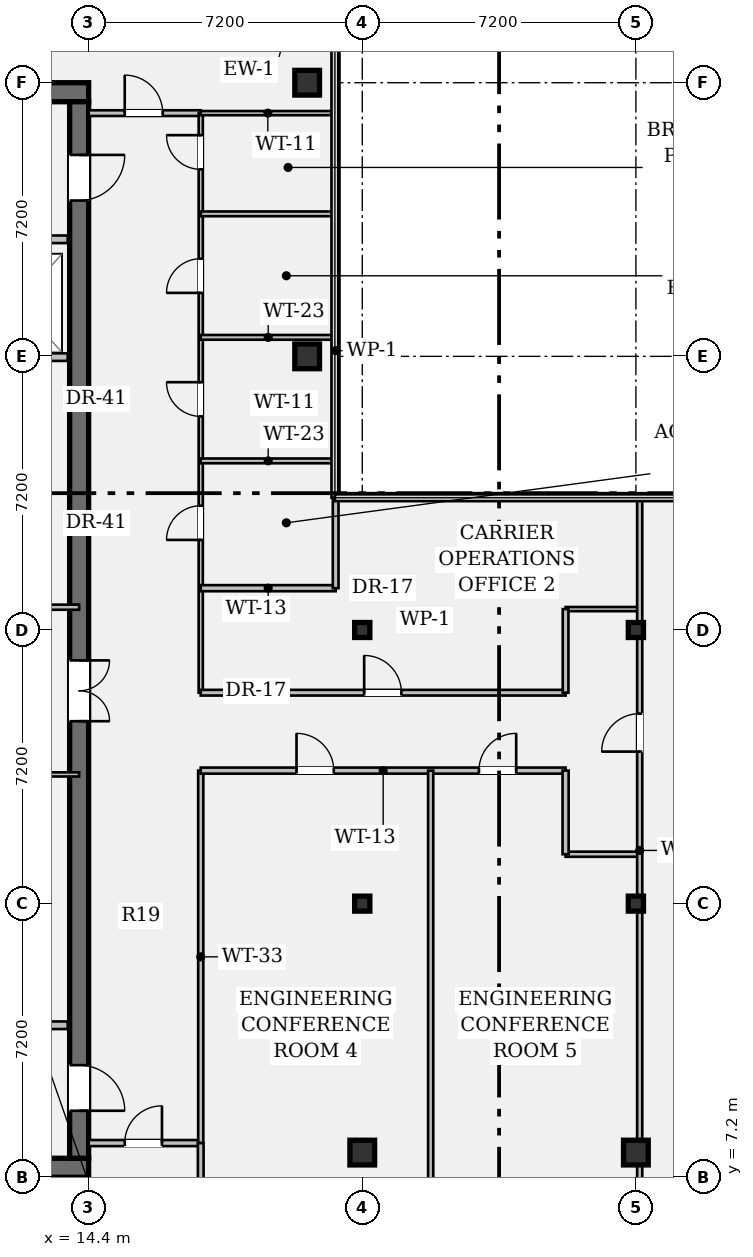
"""IFC4 building model, lengths in metres.
Left out: names, types, materials, properties, quantities, classifications, styles, units other than length and angle.
Written with IfcOpenShell. Run it as: python <this file> out.ifc"""

import sys

from ifc_helpers import new_model, si_unit, direction, frame, frame_2d, origin, origin_2d, place, context, subcontext, project, spatial, rectangle, hollow_rectangle, i_section, extrude, element, fill, save


model = new_model("IFC4")
c1 = context("Model", 3, precision=1e-05, world=origin(), true_north=direction((0.0, 1.0)))
c2 = subcontext(c1, "Body", "Model", "MODEL_VIEW")
j1 = project(units=[si_unit("LENGTHUNIT", "METRE"), si_unit("PLANEANGLEUNIT", "RADIAN")], contexts=[c1])
p1 = place(None, origin())
s1 = spatial("IfcSite", under=j1, at=p1, CompositionType="ELEMENT")
p2 = place(p1, origin())
s2 = spatial("IfcBuilding", under=s1, at=p2, CompositionType="ELEMENT")
p3 = place(p2, frame((0.0, 0.0, 262.15)))
s3 = spatial("IfcBuildingStorey", under=s2, at=p3, CompositionType="ELEMENT", Elevation=262.15)
for number, where, z_axis, x_axis in (
    (1, (0.5, 7.45, 0.0), (0.0, 0.0, 1.0), (1.0, 0.0, 0.0)),
    (2, (0.5, 35.75, 0.0), (0.0, 0.0, 1.0), (1.0, 0.0, 0.0)),
):
    element("IfcWall", number, at=place(p3, frame(where, z_axis=z_axis, x_axis=x_axis)), inside=s3, PredefinedType="SHEAR", context=c2, shape_type="SweptSolid", body=[
        extrude(rectangle(XDim=13.9, YDim=0.5, at=frame_2d((6.95, 0.0))), origin(), (0.0, 0.0, 1.0), 3.24),
    ])
p4 = place(p3, frame((14.15, 35.5, 0.0), z_axis=(0.0, 0.0, 1.0), x_axis=(0.0, -1.0, 0.0)))
e3 = element("IfcWall", 3, at=p4, inside=s3, PredefinedType="SHEAR", context=c2, shape_type="SweptSolid", body=[
    extrude(rectangle(XDim=27.8, YDim=0.5, at=frame_2d((13.9, 0.0))), origin(), (0.0, 0.0, 1.0), 3.24),
])
p5 = place(p4, frame((1.4, 0.0, 0.0)))
e4 = element("IfcOpeningElement", 4, at=p5, cuts=e3, PredefinedType="OPENING", context=c2, shape_type="SweptSolid", body=[
    extrude(rectangle(XDim=1.2, YDim=2.15, at=frame_2d((0.6, 1.075))), frame((0.0, 0.262, 0.0), z_axis=(0.0, -1.0, 0.0), x_axis=(1.0, 0.0, 0.0)), (0.0, 0.0, 1.0), 0.524),
])
p6 = place(p4, frame((25.35, 0.0, 0.0)))
e5 = element("IfcOpeningElement", 5, at=p6, cuts=e3, PredefinedType="OPENING", context=c2, shape_type="SweptSolid", body=[
    extrude(rectangle(XDim=1.2, YDim=2.15, at=frame_2d((0.6, 1.075))), frame((0.0, 0.262, 0.0), z_axis=(0.0, -1.0, 0.0), x_axis=(1.0, 0.0, 0.0)), (0.0, 0.0, 1.0), 0.524),
])
p7 = place(p4, frame((14.7, 0.0, 0.0)))
e6 = element("IfcOpeningElement", 6, at=p7, cuts=e3, PredefinedType="OPENING", context=c2, shape_type="SweptSolid", body=[
    extrude(rectangle(XDim=1.6, YDim=2.2, at=frame_2d((0.8, 1.1))), frame((0.0, 0.262, 0.0), z_axis=(0.0, -1.0, 0.0), x_axis=(1.0, 0.0, 0.0)), (0.0, 0.0, 1.0), 0.524),
])
for number, where, z_axis, x_axis in (
    (7, (20.15, 28.8, 0.0), (0.0, 0.0, 1.0), (1.0, 0.0, 0.0)),
    (8, (20.15, 36.0, 0.0), (0.0, 0.0, 1.0), (1.0, 0.0, 0.0)),
    (9, (21.6, 7.85, 0.0), (0.0, 0.0, 1.0), (1.0, 0.0, 0.0)),
):
    element("IfcColumn", number, at=place(p3, frame(where, z_axis=z_axis, x_axis=x_axis)), inside=s3, PredefinedType="COLUMN", context=c2, shape_type="SweptSolid", body=[
        extrude(hollow_rectangle(XDim=0.65, YDim=0.65, WallThickness=0.04, at=origin_2d()), origin(), (0.0, 0.0, 1.0), 3.24),
    ])
for number, where, z_axis, x_axis in (
    (10, (21.6, 14.4, 0.0), (0.0, 0.0, 1.0), (1.0, 0.0, 0.0)),
    (11, (21.6, 21.6, 0.0), (0.0, 0.0, 1.0), (1.0, 0.0, 0.0)),
):
    element("IfcColumn", number, at=place(p3, frame(where, z_axis=z_axis, x_axis=x_axis)), inside=s3, PredefinedType="COLUMN", context=c2, shape_type="SweptSolid", body=[
        extrude(i_section(OverallWidth=0.399, OverallDepth=0.394, WebThickness=0.023, FlangeThickness=0.037, FilletRadius=0.018, at=origin_2d()), origin(), (0.0, 0.0, 1.0), 3.24),
    ])
p8 = place(p3, frame((28.8, 7.85, 0.0), z_axis=(0.0, 0.0, 1.0), x_axis=(1.0, 0.0, 0.0)))
e12 = element("IfcColumn", 12, at=p8, inside=s3, PredefinedType="COLUMN", context=c2, shape_type="SweptSolid", body=[
    extrude(hollow_rectangle(XDim=0.65, YDim=0.65, WallThickness=0.04, at=origin_2d()), origin(), (0.0, 0.0, 1.0), 3.24),
])
for number, where, z_axis, x_axis in (
    (13, (28.8, 14.4, 0.0), (0.0, 0.0, 1.0), (1.0, 0.0, 0.0)),
    (14, (28.8, 21.6, 0.0), (0.0, 0.0, 1.0), (1.0, 0.0, 0.0)),
):
    element("IfcColumn", number, at=place(p3, frame(where, z_axis=z_axis, x_axis=x_axis)), inside=s3, PredefinedType="COLUMN", context=c2, shape_type="SweptSolid", body=[
        extrude(i_section(OverallWidth=0.399, OverallDepth=0.394, WebThickness=0.023, FlangeThickness=0.037, FilletRadius=0.018, at=origin_2d()), origin(), (0.0, 0.0, 1.0), 3.24),
    ])
p9 = place(p3, frame((8.7, 31.88, 0.0), z_axis=(0.0, 0.0, 1.0), x_axis=(1.0, 0.0, 0.0)))
e15 = element("IfcWall", 15, at=p9, inside=s3, PredefinedType="PARTITIONING", context=c2, shape_type="SweptSolid", body=[
    extrude(rectangle(XDim=5.15, YDim=0.2, at=frame_2d((2.575, 0.0))), origin(), (0.0, 0.0, 1.0), 3.24),
])
p10 = place(p9, frame((0.75, 0.0, 0.0)))
e16 = element("IfcOpeningElement", 16, at=p10, cuts=e15, PredefinedType="OPENING", context=c2, shape_type="SweptSolid", body=[
    extrude(rectangle(XDim=1.2, YDim=2.2, at=frame_2d((0.6, 1.1))), frame((0.0, 0.112, 0.0), z_axis=(0.0, -1.0, 0.0), x_axis=(1.0, 0.0, 0.0)), (0.0, 0.0, 1.0), 0.224),
])
p11 = place(p9, frame((3.25, 0.0, 0.0)))
e17 = element("IfcOpeningElement", 17, at=p11, cuts=e15, PredefinedType="OPENING", context=c2, shape_type="SweptSolid", body=[
    extrude(rectangle(XDim=1.2, YDim=2.2, at=frame_2d((0.6, 1.1))), frame((0.0, 0.112, 0.0), z_axis=(0.0, -1.0, 0.0), x_axis=(1.0, 0.0, 0.0)), (0.0, 0.0, 1.0), 0.224),
])
for number, where, z_axis, x_axis in (
    (18, (8.7, 11.2, 0.0), (0.0, 0.0, 1.0), (1.0, 0.0, 0.0)),
    (19, (8.7, 28.78, 0.0), (0.0, 0.0, 1.0), (1.0, 0.0, 0.0)),
):
    element("IfcWall", number, at=place(p3, frame(where, z_axis=z_axis, x_axis=x_axis)), inside=s3, PredefinedType="PARTITIONING", context=c2, shape_type="SweptSolid", body=[
        extrude(rectangle(XDim=5.15, YDim=0.2, at=frame_2d((2.575, 0.0))), origin(), (0.0, 0.0, 1.0), 3.24),
    ])
p12 = place(p3, frame((7.1, 22.2, 0.0), z_axis=(0.0, 0.0, 1.0), x_axis=(1.0, 0.0, 0.0)))
e20 = element("IfcWall", 20, at=p12, inside=s3, PredefinedType="PARTITIONING", context=c2, shape_type="SweptSolid", body=[
    extrude(rectangle(XDim=7.05, YDim=0.135, at=frame_2d((3.525, 0.0))), origin(), (0.0, 0.0, 1.0), 3.24),
])
p13 = place(p12, frame((2.4, 0.0, 0.0)))
e21 = element("IfcOpeningElement", 21, at=p13, cuts=e20, PredefinedType="OPENING", context=c2, shape_type="SweptSolid", body=[
    extrude(rectangle(XDim=1.0, YDim=2.15, at=frame_2d((0.5, 1.075))), frame((0.0, 0.08, 0.0), z_axis=(0.0, -1.0, 0.0), x_axis=(1.0, 0.0, 0.0)), (0.0, 0.0, 1.0), 0.159),
])
p14 = place(p3, frame((5.15, 17.8, 0.0), z_axis=(0.0, 0.0, 1.0), x_axis=(1.0, 0.0, 0.0)))
e22 = element("IfcWall", 22, at=p14, inside=s3, PredefinedType="PARTITIONING", context=c2, shape_type="SweptSolid", body=[
    extrude(rectangle(XDim=9.0, YDim=0.11, at=frame_2d((4.5, 0.0))), origin(), (0.0, 0.0, 1.0), 3.24),
])
p15 = place(p14, frame((2.65, 0.0, 0.0)))
e23 = element("IfcOpeningElement", 23, at=p15, cuts=e22, PredefinedType="OPENING", context=c2, shape_type="SweptSolid", body=[
    extrude(rectangle(XDim=0.9, YDim=2.15, at=frame_2d((0.45, 1.075))), frame((0.0, 0.067, 0.0), z_axis=(0.0, -1.0, 0.0), x_axis=(1.0, 0.0, 0.0)), (0.0, 0.0, 1.0), 0.134),
])
p16 = place(p14, frame((6.15, 0.0, 0.0)))
e24 = element("IfcOpeningElement", 24, at=p16, cuts=e22, PredefinedType="OPENING", context=c2, shape_type="SweptSolid", body=[
    extrude(rectangle(XDim=0.98, YDim=2.15, at=frame_2d((0.49, 1.075))), frame((0.0, 0.067, 0.0), z_axis=(0.0, -1.0, 0.0), x_axis=(1.0, 0.0, 0.0)), (0.0, 0.0, 1.0), 0.134),
])
p17 = place(p3, frame((14.4, 8.1, 0.0), z_axis=(0.0, 0.0, 1.0), x_axis=(1.0, 0.0, 0.0)))
e25 = element("IfcWall", 25, at=p17, inside=s3, PredefinedType="PARTITIONING", context=c2, shape_type="SweptSolid", body=[
    extrude(rectangle(XDim=2.95, YDim=0.16, at=frame_2d((1.475, 0.0))), origin(), (0.0, 0.0, 1.0), 3.24),
])
p18 = place(p17, frame((0.95, 0.0, 0.0)))
e26 = element("IfcOpeningElement", 26, at=p18, cuts=e25, PredefinedType="OPENING", context=c2, shape_type="SweptSolid", body=[
    extrude(rectangle(XDim=0.98, YDim=2.15, at=frame_2d((0.49, 1.075))), frame((0.0, 0.092, 0.0), z_axis=(0.0, -1.0, 0.0), x_axis=(1.0, 0.0, 0.0)), (0.0, 0.0, 1.0), 0.184),
])
p19 = place(p3, frame((14.4, 35.2, 0.0), z_axis=(0.0, 0.0, 1.0), x_axis=(1.0, 0.0, 0.0)))
e27 = element("IfcWall", 27, at=p19, inside=s3, PredefinedType="PARTITIONING", context=c2, shape_type="SweptSolid", body=[
    extrude(rectangle(XDim=2.95, YDim=0.15, at=frame_2d((1.475, 0.0))), origin(), (0.0, 0.0, 1.0), 2.808),
])
p20 = place(p19, frame((0.95, 0.0, 0.0)))
e28 = element("IfcOpeningElement", 28, at=p20, cuts=e27, PredefinedType="OPENING", context=c2, shape_type="SweptSolid", body=[
    extrude(rectangle(XDim=1.0, YDim=2.15, at=frame_2d((0.5, 1.075))), frame((0.0, 0.087, 0.0), z_axis=(0.0, -1.0, 0.0), x_axis=(1.0, 0.0, 0.0)), (0.0, 0.0, 1.0), 0.174),
])
p21 = place(p3, frame((17.35, 8.1, 0.0), z_axis=(0.0, 0.0, 1.0), x_axis=(0.0, 1.0, 0.0)))
e29 = element("IfcWall", 29, at=p21, inside=s3, PredefinedType="PARTITIONING", context=c2, shape_type="SweptSolid", body=[
    extrude(rectangle(XDim=9.8, YDim=0.135, at=frame_2d((4.9, 0.0))), origin(), (0.0, 0.0, 1.0), 2.676),
])
p22 = place(p3, frame((17.35, 19.95, 0.0), z_axis=(0.0, 0.0, 1.0), x_axis=(0.0, 1.0, 0.0)))
e30 = element("IfcWall", 30, at=p22, inside=s3, PredefinedType="PARTITIONING", context=c2, shape_type="SweptSolid", body=[
    extrude(rectangle(XDim=15.25, YDim=0.11, at=frame_2d((7.625, 0.0))), origin(), (0.0, 0.0, 1.0), 2.676),
])
p23 = place(p22, frame((4.02, 0.0, 0.0)))
e31 = element("IfcOpeningElement", 31, at=p23, cuts=e30, PredefinedType="OPENING", context=c2, shape_type="SweptSolid", body=[
    extrude(rectangle(XDim=0.9, YDim=2.15, at=frame_2d((0.45, 1.075))), frame((0.0, 0.067, 0.0), z_axis=(0.0, -1.0, 0.0), x_axis=(1.0, 0.0, 0.0)), (0.0, 0.0, 1.0), 0.134),
])
p24 = place(p22, frame((7.27, 0.0, 0.0)))
e32 = element("IfcOpeningElement", 32, at=p24, cuts=e30, PredefinedType="OPENING", context=c2, shape_type="SweptSolid", body=[
    extrude(rectangle(XDim=0.9, YDim=2.15, at=frame_2d((0.45, 1.075))), frame((0.0, 0.067, 0.0), z_axis=(0.0, -1.0, 0.0), x_axis=(1.0, 0.0, 0.0)), (0.0, 0.0, 1.0), 0.134),
])
p25 = place(p22, frame((10.52, 0.0, 0.0)))
e33 = element("IfcOpeningElement", 33, at=p25, cuts=e30, PredefinedType="OPENING", context=c2, shape_type="SweptSolid", body=[
    extrude(rectangle(XDim=0.9, YDim=2.15, at=frame_2d((0.45, 1.075))), frame((0.0, 0.067, 0.0), z_axis=(0.0, -1.0, 0.0), x_axis=(1.0, 0.0, 0.0)), (0.0, 0.0, 1.0), 0.134),
])
p26 = place(p22, frame((13.77, 0.0, 0.0)))
e34 = element("IfcOpeningElement", 34, at=p26, cuts=e30, PredefinedType="OPENING", context=c2, shape_type="SweptSolid", body=[
    extrude(rectangle(XDim=0.9, YDim=2.15, at=frame_2d((0.45, 1.075))), frame((0.0, 0.067, 0.0), z_axis=(0.0, -1.0, 0.0), x_axis=(1.0, 0.0, 0.0)), (0.0, 0.0, 1.0), 0.134),
])
p27 = place(p3, frame((17.35, 17.9, 0.0), z_axis=(0.0, 0.0, 1.0), x_axis=(1.0, 0.0, 0.0)))
e35 = element("IfcWall", 35, at=p27, inside=s3, PredefinedType="PARTITIONING", context=c2, shape_type="SweptSolid", body=[
    extrude(rectangle(XDim=9.6, YDim=0.16, at=frame_2d((4.8, 0.0))), origin(), (0.0, 0.0, 1.0), 2.676),
])
p28 = place(p27, frame((2.52, 0.0, 0.0)))
e36 = element("IfcOpeningElement", 36, at=p28, cuts=e35, PredefinedType="OPENING", context=c2, shape_type="SweptSolid", body=[
    extrude(rectangle(XDim=0.98, YDim=2.15, at=frame_2d((0.49, 1.075))), frame((0.0, 0.092, 0.0), z_axis=(0.0, -1.0, 0.0), x_axis=(1.0, 0.0, 0.0)), (0.0, 0.0, 1.0), 0.184),
])
p29 = place(p27, frame((7.32, 0.0, 0.0)))
e37 = element("IfcOpeningElement", 37, at=p29, cuts=e35, PredefinedType="OPENING", context=c2, shape_type="SweptSolid", body=[
    extrude(rectangle(XDim=0.98, YDim=2.15, at=frame_2d((0.49, 1.075))), frame((0.0, 0.092, 0.0), z_axis=(0.0, -1.0, 0.0), x_axis=(1.0, 0.0, 0.0)), (0.0, 0.0, 1.0), 0.184),
])
p30 = place(p3, frame((17.35, 19.95, 0.0), z_axis=(0.0, 0.0, 1.0), x_axis=(1.0, 0.0, 0.0)))
e38 = element("IfcWall", 38, at=p30, inside=s3, PredefinedType="PARTITIONING", context=c2, shape_type="SweptSolid", body=[
    extrude(rectangle(XDim=9.6, YDim=0.15, at=frame_2d((4.8, 0.0))), origin(), (0.0, 0.0, 1.0), 2.676),
])
p31 = place(p30, frame((4.3, 0.0, 0.0)))
e39 = element("IfcOpeningElement", 39, at=p31, cuts=e38, PredefinedType="OPENING", context=c2, shape_type="SweptSolid", body=[
    extrude(rectangle(XDim=0.98, YDim=2.15, at=frame_2d((0.49, 1.075))), frame((0.0, 0.087, 0.0), z_axis=(0.0, -1.0, 0.0), x_axis=(1.0, 0.0, 0.0)), (0.0, 0.0, 1.0), 0.174),
])
p32 = place(p3, frame((26.95, 15.7, 0.0), z_axis=(0.0, 0.0, 1.0), x_axis=(1.0, 0.0, 0.0)))
e40 = element("IfcWall", 40, at=p32, inside=s3, PredefinedType="PARTITIONING", context=c2, shape_type="SweptSolid", body=[
    extrude(rectangle(XDim=1.95, YDim=0.135, at=frame_2d((0.975, 0.0))), origin(), (0.0, 0.0, 1.0), 2.676),
])
p33 = place(p3, frame((26.95, 22.15, 0.0), z_axis=(0.0, 0.0, 1.0), x_axis=(1.0, 0.0, 0.0)))
e41 = element("IfcWall", 41, at=p33, inside=s3, PredefinedType="PARTITIONING", context=c2, shape_type="SweptSolid", body=[
    extrude(rectangle(XDim=1.95, YDim=0.11, at=frame_2d((0.975, 0.0))), origin(), (0.0, 0.0, 1.0), 3.24),
])
p34 = place(p3, frame((26.95, 15.7, 0.0), z_axis=(0.0, 0.0, 1.0), x_axis=(0.0, 1.0, 0.0)))
e42 = element("IfcWall", 42, at=p34, inside=s3, PredefinedType="PARTITIONING", context=c2, shape_type="SweptSolid", body=[
    extrude(rectangle(XDim=2.2, YDim=0.16, at=frame_2d((1.1, 0.0))), origin(), (0.0, 0.0, 1.0), 3.24),
])
p35 = place(p3, frame((26.95, 19.95, 0.0), z_axis=(0.0, 0.0, 1.0), x_axis=(0.0, 1.0, 0.0)))
e43 = element("IfcWall", 43, at=p35, inside=s3, PredefinedType="PARTITIONING", context=c2, shape_type="SweptSolid", body=[
    extrude(rectangle(XDim=2.2, YDim=0.15, at=frame_2d((1.1, 0.0))), origin(), (0.0, 0.0, 1.0), 2.676),
])
p36 = place(p3, frame((28.9, 6.52, 0.0), z_axis=(0.0, 0.0, 1.0), x_axis=(0.0, 1.0, 0.0)))
e44 = element("IfcWall", 44, at=p36, inside=s3, PredefinedType="PARTITIONING", context=c2, shape_type="SweptSolid", body=[
    extrude(rectangle(XDim=18.56, YDim=0.135, at=frame_2d((9.28, 0.0))), origin(), (0.0, 0.0, 1.0), 2.676),
])
p37 = place(p36, frame((11.88, 0.0, 0.0)))
e45 = element("IfcOpeningElement", 45, at=p37, cuts=e44, PredefinedType="OPENING", context=c2, shape_type="SweptSolid", body=[
    extrude(rectangle(XDim=1.0, YDim=2.15, at=frame_2d((0.5, 1.075))), frame((0.0, 0.08, 0.0), z_axis=(0.0, -1.0, 0.0), x_axis=(1.0, 0.0, 0.0)), (0.0, 0.0, 1.0), 0.159),
])
p38 = place(p3, frame((17.35, 35.2, 0.0), z_axis=(0.0, 0.0, 1.0), x_axis=(1.0, 0.0, 0.0)))
e46 = element("IfcWall", 46, at=p38, inside=s3, PredefinedType="PARTITIONING", context=c2, shape_type="SweptSolid", body=[
    extrude(rectangle(XDim=3.53, YDim=0.11, at=frame_2d((1.765, 0.0))), origin(), (0.0, 0.0, 1.0), 2.808),
])
p39 = place(p3, frame((17.35, 22.7, 0.0), z_axis=(0.0, 0.0, 1.0), x_axis=(1.0, 0.0, 0.0)))
e47 = element("IfcWall", 47, at=p39, inside=s3, PredefinedType="PARTITIONING", context=c2, shape_type="SweptSolid", body=[
    extrude(rectangle(XDim=3.55, YDim=0.16, at=frame_2d((1.775, 0.0))), origin(), (0.0, 0.0, 1.0), 2.808),
])
p40 = place(p3, frame((20.9, 22.7, 0.0), z_axis=(0.0, 0.0, 1.0), x_axis=(0.0, 1.0, 0.0)))
e48 = element("IfcWall", 48, at=p40, inside=s3, PredefinedType="PARTITIONING", context=c2, shape_type="SweptSolid", body=[
    extrude(rectangle(XDim=12.5, YDim=0.15, at=frame_2d((6.25, 0.0))), origin(), (0.0, 0.0, 1.0), 3.24),
])
for number, where, z_axis, x_axis in (
    (49, (17.35, 26.05, 0.0), (0.0, 0.0, 1.0), (1.0, 0.0, 0.0)),
    (50, (17.35, 29.3, 0.0), (0.0, 0.0, 1.0), (1.0, 0.0, 0.0)),
    (51, (17.35, 32.55, 0.0), (0.0, 0.0, 1.0), (1.0, 0.0, 0.0)),
):
    element("IfcWall", number, at=place(p3, frame(where, z_axis=z_axis, x_axis=x_axis)), inside=s3, PredefinedType="PARTITIONING", context=c2, shape_type="SweptSolid", body=[
        extrude(rectangle(XDim=3.55, YDim=0.125, at=frame_2d((1.775, 0.0))), origin(), (0.0, 0.0, 1.0), 2.808),
    ])
p41 = place(p3, frame((17.35, 6.52, 0.0), z_axis=(0.0, 0.0, 1.0), x_axis=(0.0, 1.0, 0.0)))
e52 = element("IfcWall", 52, at=p41, inside=s3, PredefinedType="PARTITIONING", context=c2, shape_type="SweptSolid", body=[
    extrude(rectangle(XDim=1.58, YDim=0.15, at=frame_2d((0.79, 0.0))), origin(), (0.0, 0.0, 1.0), 3.24),
])
p42 = place(p3, frame((23.4, 6.52, 0.0), z_axis=(0.0, 0.0, 1.0), x_axis=(0.0, 1.0, 0.0)))
e53 = element("IfcWall", 53, at=p42, inside=s3, PredefinedType="PARTITIONING", context=c2, shape_type="SweptSolid", body=[
    extrude(rectangle(XDim=11.38, YDim=0.135, at=frame_2d((5.69, 0.0))), origin(), (0.0, 0.0, 1.0), 2.676),
])
p43 = place(p5, origin())
e54 = element("IfcDoor", 54, at=p43, inside=s3, OperationType="SINGLE_SWING_LEFT", PredefinedType="DOOR", context=c2, shape_type="SweptSolid", body=[
    extrude(rectangle(XDim=1.2, YDim=2.15, at=frame_2d((0.6, 1.075))), frame((0.0, 0.025, 0.0), z_axis=(0.0, -1.0, 0.0), x_axis=(1.0, 0.0, 0.0)), (0.0, 0.0, 1.0), 0.05),
])
fill(e4, e54)
p44 = place(p6, origin())
e55 = element("IfcDoor", 55, at=p44, inside=s3, OperationType="SINGLE_SWING_RIGHT", PredefinedType="DOOR", context=c2, shape_type="SweptSolid", body=[
    extrude(rectangle(XDim=1.2, YDim=2.15, at=frame_2d((0.6, 1.075))), frame((0.0, 0.025, 0.0), z_axis=(0.0, -1.0, 0.0), x_axis=(1.0, 0.0, 0.0)), (0.0, 0.0, 1.0), 0.05),
])
fill(e5, e55)
p45 = place(p7, origin())
e56 = element("IfcDoor", 56, at=p45, inside=s3, OperationType="DOUBLE_DOOR_SINGLE_SWING", PredefinedType="DOOR", context=c2, shape_type="SweptSolid", body=[
    extrude(rectangle(XDim=1.6, YDim=2.2, at=frame_2d((0.8, 1.1))), frame((0.0, 0.025, 0.0), z_axis=(0.0, -1.0, 0.0), x_axis=(1.0, 0.0, 0.0)), (0.0, 0.0, 1.0), 0.05),
])
fill(e6, e56)
p46 = place(p20, origin())
e57 = element("IfcDoor", 57, at=p46, inside=s3, OperationType="SINGLE_SWING_LEFT", PredefinedType="DOOR", context=c2, shape_type="SweptSolid", body=[
    extrude(rectangle(XDim=1.0, YDim=2.15, at=frame_2d((0.5, 1.075))), frame((0.0, 0.025, 0.0), z_axis=(0.0, -1.0, 0.0), x_axis=(1.0, 0.0, 0.0)), (0.0, 0.0, 1.0), 0.05),
])
fill(e28, e57)
p47 = place(p23, origin())
e58 = element("IfcDoor", 58, at=p47, inside=s3, OperationType="SINGLE_SWING_LEFT", PredefinedType="DOOR", context=c2, shape_type="SweptSolid", body=[
    extrude(rectangle(XDim=0.9, YDim=2.15, at=frame_2d((0.45, 1.075))), frame((0.0, 0.025, 0.0), z_axis=(0.0, -1.0, 0.0), x_axis=(1.0, 0.0, 0.0)), (0.0, 0.0, 1.0), 0.05),
])
fill(e31, e58)
p48 = place(p24, origin())
e59 = element("IfcDoor", 59, at=p48, inside=s3, OperationType="SINGLE_SWING_RIGHT", PredefinedType="DOOR", context=c2, shape_type="SweptSolid", body=[
    extrude(rectangle(XDim=0.9, YDim=2.15, at=frame_2d((0.45, 1.075))), frame((0.0, 0.025, 0.0), z_axis=(0.0, -1.0, 0.0), x_axis=(1.0, 0.0, 0.0)), (0.0, 0.0, 1.0), 0.05),
])
fill(e32, e59)
p49 = place(p25, origin())
e60 = element("IfcDoor", 60, at=p49, inside=s3, OperationType="SINGLE_SWING_LEFT", PredefinedType="DOOR", context=c2, shape_type="SweptSolid", body=[
    extrude(rectangle(XDim=0.9, YDim=2.15, at=frame_2d((0.45, 1.075))), frame((0.0, 0.025, 0.0), z_axis=(0.0, -1.0, 0.0), x_axis=(1.0, 0.0, 0.0)), (0.0, 0.0, 1.0), 0.05),
])
fill(e33, e60)
p50 = place(p26, origin())
e61 = element("IfcDoor", 61, at=p50, inside=s3, OperationType="SINGLE_SWING_RIGHT", PredefinedType="DOOR", context=c2, shape_type="SweptSolid", body=[
    extrude(rectangle(XDim=0.9, YDim=2.15, at=frame_2d((0.45, 1.075))), frame((0.0, 0.025, 0.0), z_axis=(0.0, -1.0, 0.0), x_axis=(1.0, 0.0, 0.0)), (0.0, 0.0, 1.0), 0.05),
])
fill(e34, e61)
p51 = place(p31, origin())
e62 = element("IfcDoor", 62, at=p51, inside=s3, OperationType="SINGLE_SWING_LEFT", PredefinedType="DOOR", context=c2, shape_type="SweptSolid", body=[
    extrude(rectangle(XDim=0.98, YDim=2.15, at=frame_2d((0.49, 1.075))), frame((0.0, 0.025, 0.0), z_axis=(0.0, -1.0, 0.0), x_axis=(1.0, 0.0, 0.0)), (0.0, 0.0, 1.0), 0.05),
])
fill(e39, e62)
p52 = place(p18, origin())
e63 = element("IfcDoor", 63, at=p52, inside=s3, OperationType="SINGLE_SWING_RIGHT", PredefinedType="DOOR", context=c2, shape_type="SweptSolid", body=[
    extrude(rectangle(XDim=0.98, YDim=2.15, at=frame_2d((0.49, 1.075))), frame((0.0, 0.025, 0.0), z_axis=(0.0, -1.0, 0.0), x_axis=(1.0, 0.0, 0.0)), (0.0, 0.0, 1.0), 0.05),
])
fill(e26, e63)
p53 = place(p28, origin())
e64 = element("IfcDoor", 64, at=p53, inside=s3, OperationType="SINGLE_SWING_LEFT", PredefinedType="DOOR", context=c2, shape_type="SweptSolid", body=[
    extrude(rectangle(XDim=0.98, YDim=2.15, at=frame_2d((0.49, 1.075))), frame((0.0, 0.025, 0.0), z_axis=(0.0, -1.0, 0.0), x_axis=(1.0, 0.0, 0.0)), (0.0, 0.0, 1.0), 0.05),
])
fill(e36, e64)
p54 = place(p29, origin())
e65 = element("IfcDoor", 65, at=p54, inside=s3, OperationType="SINGLE_SWING_RIGHT", PredefinedType="DOOR", context=c2, shape_type="SweptSolid", body=[
    extrude(rectangle(XDim=0.98, YDim=2.15, at=frame_2d((0.49, 1.075))), frame((0.0, 0.025, 0.0), z_axis=(0.0, -1.0, 0.0), x_axis=(1.0, 0.0, 0.0)), (0.0, 0.0, 1.0), 0.05),
])
fill(e37, e65)
p55 = place(p37, origin())
e66 = element("IfcDoor", 66, at=p55, inside=s3, OperationType="SINGLE_SWING_LEFT", PredefinedType="DOOR", context=c2, shape_type="SweptSolid", body=[
    extrude(rectangle(XDim=1.0, YDim=2.15, at=frame_2d((0.5, 1.075))), frame((0.0, 0.025, 0.0), z_axis=(0.0, -1.0, 0.0), x_axis=(1.0, 0.0, 0.0)), (0.0, 0.0, 1.0), 0.05),
])
fill(e45, e66)
save(model, sys.argv[1])
